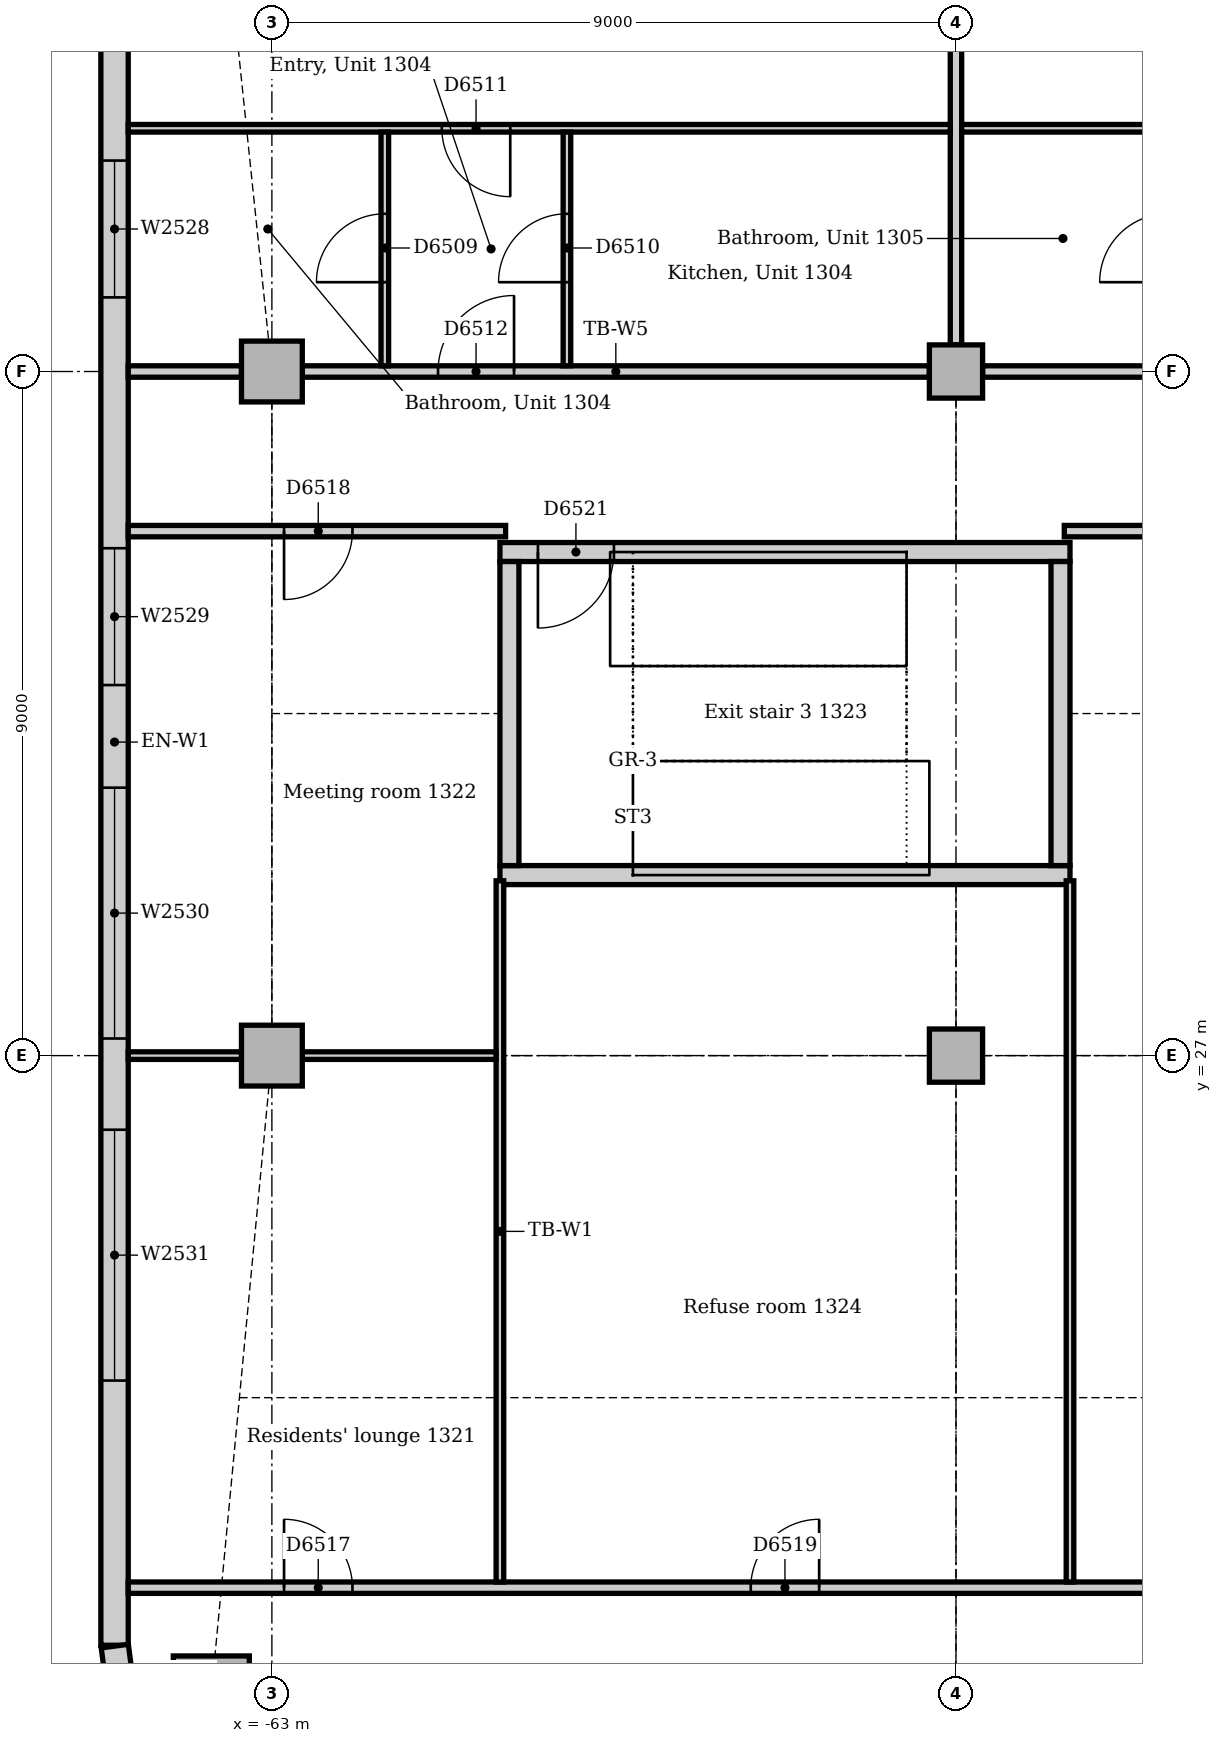
"""IFC4 building model, lengths in metres.
Left out: names, types, materials, properties, quantities, classifications, styles, units other than length and angle.
Written with IfcOpenShell. Run it as: python <this file> out.ifc"""

import sys

from ifc_helpers import new_model, si_unit, direction, frame, frame_2d, origin, origin_2d, place, context, subcontext, project, spatial, rectangle, extrude, element, fill, save


model = new_model("IFC4")
c1 = context("Model", 3, precision=1e-05, world=origin(), true_north=direction((0.0, 1.0)))
c2 = subcontext(c1, "Body", "Model", "MODEL_VIEW")
j1 = project(units=[si_unit("LENGTHUNIT", "METRE"), si_unit("PLANEANGLEUNIT", "RADIAN")], contexts=[c1])
p1 = place(None, origin())
s1 = spatial("IfcSite", under=j1, at=p1, CompositionType="ELEMENT")
p2 = place(p1, origin())
s2 = spatial("IfcBuilding", under=s1, at=p2, CompositionType="ELEMENT")
p3 = place(p2, frame((0.0, 0.0, 59.0)))
s3 = spatial("IfcBuildingStorey", under=s2, at=p3, CompositionType="ELEMENT", Elevation=59.0)
p4 = place(p3, frame((-60.0, 29.375, 0.0), z_axis=(0.0, 0.0, 1.0), x_axis=(1.0, 0.0, 0.0)))
e1 = element("IfcWall", 1, at=p4, inside=s3, PredefinedType="SOLIDWALL", context=c2, shape_type="SweptSolid", body=[
    extrude(rectangle(XDim=7.5, YDim=0.25, at=frame_2d((3.75, 0.0))), origin(), (0.0, 0.0, 1.0), 4.0),
])
p5 = place(p3, frame((-52.5, 33.625, 0.0), z_axis=(0.0, 0.0, 1.0), x_axis=(-1.0, 0.0, 0.0)))
e2 = element("IfcWall", 2, at=p5, inside=s3, PredefinedType="SOLIDWALL", context=c2, shape_type="SweptSolid", body=[
    extrude(rectangle(XDim=7.5, YDim=0.25, at=frame_2d((3.75, 0.0))), origin(), (0.0, 0.0, 1.0), 4.0),
])
p6 = place(p5, frame((6.0, 0.0, 0.0)))
e3 = element("IfcOpeningElement", 3, at=p6, cuts=e2, PredefinedType="OPENING", context=c2, shape_type="SweptSolid", body=[
    extrude(rectangle(XDim=1.0, YDim=2.1, at=frame_2d((0.5, 1.05))), frame((0.0, 0.135, 0.0), z_axis=(0.0, -1.0, 0.0), x_axis=(1.0, 0.0, 0.0)), (0.0, 0.0, 1.0), 0.27),
])
for number, where, z_axis, x_axis in (
    (4, (-52.625, 29.5, 0.0), (0.0, 0.0, 1.0), (0.0, 1.0, 0.0)),
    (5, (-59.875, 33.5, 0.0), (0.0, 0.0, 1.0), (0.0, -1.0, 0.0)),
):
    element("IfcWall", number, at=place(p3, frame(where, z_axis=z_axis, x_axis=x_axis)), inside=s3, PredefinedType="SOLIDWALL", context=c2, shape_type="SweptSolid", body=[
        extrude(rectangle(XDim=4.0, YDim=0.25, at=frame_2d((2.0, 0.0))), origin(), (0.0, 0.0, 1.0), 4.0),
    ])
p7 = place(p3, frame((-63.797, 18.602, 0.0), z_axis=(0.0, 0.0, 1.0), x_axis=(1.0, 0.0, 0.0)))
e6 = element("IfcColumn", 6, at=p7, inside=s3, PredefinedType="COLUMN", context=c2, shape_type="SweptSolid", body=[
    extrude(rectangle(XDim=1.0, YDim=1.0, at=origin_2d()), origin(), (0.0, 0.0, 1.0), 3.85),
])
for number, where, z_axis, x_axis in (
    (7, (-63.0, 27.0, 0.0), (0.0, 0.0, 1.0), (1.0, 0.0, 0.0)),
    (8, (-63.0, 36.0, 0.0), (0.0, 0.0, 1.0), (1.0, 0.0, 0.0)),
):
    element("IfcColumn", number, at=place(p3, frame(where, z_axis=z_axis, x_axis=x_axis)), inside=s3, PredefinedType="COLUMN", context=c2, shape_type="SweptSolid", body=[
        extrude(rectangle(XDim=0.8, YDim=0.8, at=origin_2d()), origin(), (0.0, 0.0, 1.0), 3.85),
    ])
for number, where, z_axis, x_axis in (
    (9, (-54.0, 27.0, 0.0), (0.0, 0.0, 1.0), (1.0, 0.0, 0.0)),
    (10, (-54.0, 36.0, 0.0), (0.0, 0.0, 1.0), (1.0, 0.0, 0.0)),
):
    element("IfcColumn", number, at=place(p3, frame(where, z_axis=z_axis, x_axis=x_axis)), inside=s3, PredefinedType="COLUMN", context=c2, shape_type="SweptSolid", body=[
        extrude(rectangle(XDim=0.7, YDim=0.7, at=origin_2d()), origin(), (0.0, 0.0, 1.0), 3.85),
    ])
p8 = place(p3, frame((-65.07, 43.007, 0.0), z_axis=(0.0, 0.0, 1.0), x_axis=(0.0, -1.0, 0.0)))
e11 = element("IfcWall", 11, at=p8, inside=s3, PredefinedType="STANDARD", context=c2, shape_type="SweptSolid", body=[
    extrude(rectangle(XDim=23.765, YDim=0.36, at=frame_2d((11.882, 0.0))), origin(), (0.0, 0.0, 1.0), 3.85),
])
p9 = place(p8, frame((4.232, 0.0, 0.9)))
e12 = element("IfcOpeningElement", 12, at=p9, cuts=e11, PredefinedType="OPENING", context=c2, shape_type="SweptSolid", body=[
    extrude(rectangle(XDim=1.8, YDim=1.6, at=frame_2d((0.9, 0.8))), frame((0.0, 0.19, 0.0), z_axis=(0.0, -1.0, 0.0), x_axis=(1.0, 0.0, 0.0)), (0.0, 0.0, 1.0), 0.38),
])
p10 = place(p8, frame((9.332, 0.0, 0.9)))
e13 = element("IfcOpeningElement", 13, at=p10, cuts=e11, PredefinedType="OPENING", context=c2, shape_type="SweptSolid", body=[
    extrude(rectangle(XDim=1.8, YDim=1.6, at=frame_2d((0.9, 0.8))), frame((0.0, 0.19, 0.0), z_axis=(0.0, -1.0, 0.0), x_axis=(1.0, 0.0, 0.0)), (0.0, 0.0, 1.0), 0.38),
])
p11 = place(p8, frame((12.482, 0.0, 0.9)))
e14 = element("IfcOpeningElement", 14, at=p11, cuts=e11, PredefinedType="OPENING", context=c2, shape_type="SweptSolid", body=[
    extrude(rectangle(XDim=3.3, YDim=1.6, at=frame_2d((1.65, 0.8))), frame((0.0, 0.19, 0.0), z_axis=(0.0, -1.0, 0.0), x_axis=(1.0, 0.0, 0.0)), (0.0, 0.0, 1.0), 0.38),
])
p12 = place(p8, frame((16.982, 0.0, 0.9)))
e15 = element("IfcOpeningElement", 15, at=p12, cuts=e11, PredefinedType="OPENING", context=c2, shape_type="SweptSolid", body=[
    extrude(rectangle(XDim=3.3, YDim=1.6, at=frame_2d((1.65, 0.8))), frame((0.0, 0.19, 0.0), z_axis=(0.0, -1.0, 0.0), x_axis=(1.0, 0.0, 0.0)), (0.0, 0.0, 1.0), 0.38),
])
p13 = place(p3, frame((-65.067, 19.231, 0.0), z_axis=(0.0, 0.0, 1.0), x_axis=(0.13055608231, -0.99144092581, 0.0)))
e16 = element("IfcWall", 16, at=p13, inside=s3, PredefinedType="STANDARD", context=c2, shape_type="SweptSolid", body=[
    extrude(rectangle(XDim=0.713, YDim=0.36, at=frame_2d((0.356, 0.0))), origin(), (0.0, 0.0, 1.0), 3.85),
])
p14 = place(p3, frame((-53.65, 36.0, 0.0), z_axis=(0.0, 0.0, 1.0), x_axis=(1.0, 0.0, 0.0)))
e17 = element("IfcWall", 17, at=p14, inside=s3, PredefinedType="PARTITIONING", context=c2, shape_type="SweptSolid", body=[
    extrude(rectangle(XDim=8.3, YDim=0.15, at=frame_2d((4.15, 0.0))), origin(), (0.0, 0.0, 1.0), 3.158),
])
p15 = place(p14, frame((2.94, 0.0, 0.0)))
e18 = element("IfcOpeningElement", 18, at=p15, cuts=e17, PredefinedType="OPENING", context=c2, shape_type="SweptSolid", body=[
    extrude(rectangle(XDim=1.0, YDim=2.1, at=frame_2d((0.5, 1.05))), frame((0.0, 0.085, 0.0), z_axis=(0.0, -1.0, 0.0), x_axis=(1.0, 0.0, 0.0)), (0.0, 0.0, 1.0), 0.17),
])
p16 = place(p3, frame((-62.6, 36.0, 0.0), z_axis=(0.0, 0.0, 1.0), x_axis=(1.0, 0.0, 0.0)))
e19 = element("IfcWall", 19, at=p16, inside=s3, PredefinedType="PARTITIONING", context=c2, shape_type="SweptSolid", body=[
    extrude(rectangle(XDim=8.25, YDim=0.15, at=frame_2d((4.125, 0.0))), origin(), (0.0, 0.0, 1.0), 3.158),
])
p17 = place(p16, frame((1.786, 0.0, 0.0)))
e20 = element("IfcOpeningElement", 20, at=p17, cuts=e19, PredefinedType="OPENING", context=c2, shape_type="SweptSolid", body=[
    extrude(rectangle(XDim=1.0, YDim=2.1, at=frame_2d((0.5, 1.05))), frame((0.0, 0.085, 0.0), z_axis=(0.0, -1.0, 0.0), x_axis=(1.0, 0.0, 0.0)), (0.0, 0.0, 1.0), 0.17),
])
p18 = place(p3, frame((-64.89, 36.0, 0.0), z_axis=(0.0, 0.0, 1.0), x_axis=(1.0, 0.0, 0.0)))
e21 = element("IfcWall", 21, at=p18, inside=s3, PredefinedType="PARTITIONING", context=c2, shape_type="SweptSolid", body=[
    extrude(rectangle(XDim=1.49, YDim=0.15, at=frame_2d((0.745, 0.0))), origin(), (0.0, 0.0, 1.0), 3.85),
])
p19 = place(p3, frame((-64.89, 20.0, 0.0), z_axis=(0.0, 0.0, 1.0), x_axis=(1.0, 0.0, 0.0)))
e22 = element("IfcWall", 22, at=p19, inside=s3, PredefinedType="PARTITIONING", context=c2, shape_type="SweptSolid", body=[
    extrude(rectangle(XDim=19.965, YDim=0.15, at=frame_2d((9.982, 0.0))), origin(), (0.0, 0.0, 1.0), 3.85),
])
p20 = place(p19, frame((2.05, 0.0, 0.0)))
e23 = element("IfcOpeningElement", 23, at=p20, cuts=e22, PredefinedType="OPENING", context=c2, shape_type="SweptSolid", body=[
    extrude(rectangle(XDim=0.9, YDim=2.1, at=frame_2d((0.45, 1.05))), frame((0.0, 0.085, 0.0), z_axis=(0.0, -1.0, 0.0), x_axis=(1.0, 0.0, 0.0)), (0.0, 0.0, 1.0), 0.17),
])
p21 = place(p19, frame((8.19, 0.0, 0.0)))
e24 = element("IfcOpeningElement", 24, at=p21, cuts=e22, PredefinedType="OPENING", context=c2, shape_type="SweptSolid", body=[
    extrude(rectangle(XDim=0.9, YDim=2.1, at=frame_2d((0.45, 1.05))), frame((0.0, 0.085, 0.0), z_axis=(0.0, -1.0, 0.0), x_axis=(1.0, 0.0, 0.0)), (0.0, 0.0, 1.0), 0.17),
])
p22 = place(p3, frame((-52.575, 33.9, 0.0), z_axis=(0.0, 0.0, 1.0), x_axis=(1.0, 0.0, 0.0)))
e25 = element("IfcWall", 25, at=p22, inside=s3, PredefinedType="PARTITIONING", context=c2, shape_type="SweptSolid", body=[
    extrude(rectangle(XDim=7.5, YDim=0.15, at=frame_2d((3.75, 0.0))), origin(), (0.0, 0.0, 1.0), 3.85),
])
p23 = place(p3, frame((-64.89, 33.9, 0.0), z_axis=(0.0, 0.0, 1.0), x_axis=(1.0, 0.0, 0.0)))
e26 = element("IfcWall", 26, at=p23, inside=s3, PredefinedType="PARTITIONING", context=c2, shape_type="SweptSolid", body=[
    extrude(rectangle(XDim=4.965, YDim=0.15, at=frame_2d((2.482, 0.0))), origin(), (0.0, 0.0, 1.0), 3.85),
])
p24 = place(p23, frame((2.05, 0.0, 0.0)))
e27 = element("IfcOpeningElement", 27, at=p24, cuts=e26, PredefinedType="OPENING", context=c2, shape_type="SweptSolid", body=[
    extrude(rectangle(XDim=0.9, YDim=2.1, at=frame_2d((0.45, 1.05))), frame((0.0, 0.085, 0.0), z_axis=(0.0, -1.0, 0.0), x_axis=(1.0, 0.0, 0.0)), (0.0, 0.0, 1.0), 0.17),
])
p25 = place(p3, frame((-54.0, 36.35, 0.0), z_axis=(0.0, 0.0, 1.0), x_axis=(0.0, 1.0, 0.0)))
e28 = element("IfcWall", 28, at=p25, inside=s3, PredefinedType="PARTITIONING", context=c2, shape_type="SweptSolid", body=[
    extrude(rectangle(XDim=9.6, YDim=0.15, at=frame_2d((4.8, 0.0))), origin(), (0.0, 0.0, 1.0), 3.256),
])
p26 = place(p3, frame((-53.925, 39.2, 0.0), z_axis=(0.0, 0.0, 1.0), x_axis=(1.0, 0.0, 0.0)))
e29 = element("IfcWall", 29, at=p26, inside=s3, PredefinedType="PARTITIONING", context=c2, shape_type="SweptSolid", body=[
    extrude(rectangle(XDim=8.975, YDim=0.1, at=frame_2d((4.487, 0.0))), origin(), (0.0, 0.0, 1.0), 3.85),
])
p27 = place(p26, frame((3.265, 0.0, 0.0)))
e30 = element("IfcOpeningElement", 30, at=p27, cuts=e29, PredefinedType="OPENING", context=c2, shape_type="SweptSolid", body=[
    extrude(rectangle(XDim=0.9, YDim=2.1, at=frame_2d((0.45, 1.05))), frame((0.0, 0.06, 0.0), z_axis=(0.0, -1.0, 0.0), x_axis=(1.0, 0.0, 0.0)), (0.0, 0.0, 1.0), 0.12),
])
p28 = place(p3, frame((-64.89, 39.2, 0.0), z_axis=(0.0, 0.0, 1.0), x_axis=(1.0, 0.0, 0.0)))
e31 = element("IfcWall", 31, at=p28, inside=s3, PredefinedType="PARTITIONING", context=c2, shape_type="SweptSolid", body=[
    extrude(rectangle(XDim=10.815, YDim=0.1, at=frame_2d((5.407, 0.0))), origin(), (0.0, 0.0, 1.0), 3.85),
])
p29 = place(p28, frame((4.126, 0.0, 0.0)))
e32 = element("IfcOpeningElement", 32, at=p29, cuts=e31, PredefinedType="OPENING", context=c2, shape_type="SweptSolid", body=[
    extrude(rectangle(XDim=0.9, YDim=2.1, at=frame_2d((0.45, 1.05))), frame((0.0, 0.06, 0.0), z_axis=(0.0, -1.0, 0.0), x_axis=(1.0, 0.0, 0.0)), (0.0, 0.0, 1.0), 0.12),
])
for number, where, z_axis, x_axis in (
    (33, (-60.0, 20.075, 0.0), (0.0, 0.0, 1.0), (0.0, 1.0, 0.0)),
    (34, (-52.5, 20.075, 0.0), (0.0, 0.0, 1.0), (0.0, 1.0, 0.0)),
):
    element("IfcWall", number, at=place(p3, frame(where, z_axis=z_axis, x_axis=x_axis)), inside=s3, PredefinedType="PARTITIONING", context=c2, shape_type="SweptSolid", body=[
        extrude(rectangle(XDim=9.225, YDim=0.1, at=frame_2d((4.612, 0.0))), origin(), (0.0, 0.0, 1.0), 3.85),
    ])
p30 = place(p3, frame((-62.6, 27.0, 0.0), z_axis=(0.0, 0.0, 1.0), x_axis=(1.0, 0.0, 0.0)))
e35 = element("IfcWall", 35, at=p30, inside=s3, PredefinedType="PARTITIONING", context=c2, shape_type="SweptSolid", body=[
    extrude(rectangle(XDim=2.55, YDim=0.1, at=frame_2d((1.275, 0.0))), origin(), (0.0, 0.0, 1.0), 3.158),
])
p31 = place(p3, frame((-64.89, 27.0, 0.0), z_axis=(0.0, 0.0, 1.0), x_axis=(1.0, 0.0, 0.0)))
e36 = element("IfcWall", 36, at=p31, inside=s3, PredefinedType="PARTITIONING", context=c2, shape_type="SweptSolid", body=[
    extrude(rectangle(XDim=1.49, YDim=0.1, at=frame_2d((0.745, 0.0))), origin(), (0.0, 0.0, 1.0), 3.85),
])
p32 = place(p3, frame((-61.514, 36.075, 0.0), z_axis=(0.0, 0.0, 1.0), x_axis=(0.0, 1.0, 0.0)))
e37 = element("IfcWall", 37, at=p32, inside=s3, PredefinedType="PARTITIONING", context=c2, shape_type="SweptSolid", body=[
    extrude(rectangle(XDim=3.075, YDim=0.1, at=frame_2d((1.538, 0.0))), origin(), (0.0, 0.0, 1.0), 3.85),
])
p33 = place(p32, frame((1.1, 0.0, 0.0)))
e38 = element("IfcOpeningElement", 38, at=p33, cuts=e37, PredefinedType="OPENING", context=c2, shape_type="SweptSolid", body=[
    extrude(rectangle(XDim=0.9, YDim=2.1, at=frame_2d((0.45, 1.05))), frame((0.0, 0.06, 0.0), z_axis=(0.0, -1.0, 0.0), x_axis=(1.0, 0.0, 0.0)), (0.0, 0.0, 1.0), 0.12),
])
p34 = place(p3, frame((-59.118, 36.075, 0.0), z_axis=(0.0, 0.0, 1.0), x_axis=(0.0, 1.0, 0.0)))
e39 = element("IfcWall", 39, at=p34, inside=s3, PredefinedType="PARTITIONING", context=c2, shape_type="SweptSolid", body=[
    extrude(rectangle(XDim=3.075, YDim=0.1, at=frame_2d((1.538, 0.0))), origin(), (0.0, 0.0, 1.0), 3.85),
])
p35 = place(p34, frame((1.1, 0.0, 0.0)))
e40 = element("IfcOpeningElement", 40, at=p35, cuts=e39, PredefinedType="OPENING", context=c2, shape_type="SweptSolid", body=[
    extrude(rectangle(XDim=0.9, YDim=2.1, at=frame_2d((0.45, 1.05))), frame((0.0, 0.06, 0.0), z_axis=(0.0, -1.0, 0.0), x_axis=(1.0, 0.0, 0.0)), (0.0, 0.0, 1.0), 0.12),
])
p36 = place(p9, origin())
e41 = element("IfcWindow", 41, at=p36, inside=s3, PartitioningType="SINGLE_PANEL", PredefinedType="WINDOW", context=c2, shape_type="SweptSolid", body=[
    extrude(rectangle(XDim=1.8, YDim=1.6, at=frame_2d((0.9, 0.8))), frame((0.0, 0.13, 0.0), z_axis=(0.0, -1.0, 0.0), x_axis=(1.0, 0.0, 0.0)), (0.0, 0.0, 1.0), 0.06),
])
fill(e12, e41)
p37 = place(p10, origin())
e42 = element("IfcWindow", 42, at=p37, inside=s3, PartitioningType="SINGLE_PANEL", PredefinedType="WINDOW", context=c2, shape_type="SweptSolid", body=[
    extrude(rectangle(XDim=1.8, YDim=1.6, at=frame_2d((0.9, 0.8))), frame((0.0, 0.13, 0.0), z_axis=(0.0, -1.0, 0.0), x_axis=(1.0, 0.0, 0.0)), (0.0, 0.0, 1.0), 0.06),
])
fill(e13, e42)
p38 = place(p11, origin())
e43 = element("IfcWindow", 43, at=p38, inside=s3, PartitioningType="SINGLE_PANEL", PredefinedType="WINDOW", context=c2, shape_type="SweptSolid", body=[
    extrude(rectangle(XDim=3.3, YDim=1.6, at=frame_2d((1.65, 0.8))), frame((0.0, 0.13, 0.0), z_axis=(0.0, -1.0, 0.0), x_axis=(1.0, 0.0, 0.0)), (0.0, 0.0, 1.0), 0.06),
])
fill(e14, e43)
p39 = place(p12, origin())
e44 = element("IfcWindow", 44, at=p39, inside=s3, PartitioningType="SINGLE_PANEL", PredefinedType="WINDOW", context=c2, shape_type="SweptSolid", body=[
    extrude(rectangle(XDim=3.3, YDim=1.6, at=frame_2d((1.65, 0.8))), frame((0.0, 0.13, 0.0), z_axis=(0.0, -1.0, 0.0), x_axis=(1.0, 0.0, 0.0)), (0.0, 0.0, 1.0), 0.06),
])
fill(e15, e44)
p40 = place(p33, origin())
e45 = element("IfcDoor", 45, at=p40, inside=s3, OperationType="SINGLE_SWING_LEFT", PredefinedType="DOOR", context=c2, shape_type="SweptSolid", body=[
    extrude(rectangle(XDim=0.9, YDim=2.1, at=frame_2d((0.45, 1.05))), frame((0.0, 0.025, 0.0), z_axis=(0.0, -1.0, 0.0), x_axis=(1.0, 0.0, 0.0)), (0.0, 0.0, 1.0), 0.05),
])
fill(e38, e45)
p41 = place(p35, origin())
e46 = element("IfcDoor", 46, at=p41, inside=s3, OperationType="SINGLE_SWING_LEFT", PredefinedType="DOOR", context=c2, shape_type="SweptSolid", body=[
    extrude(rectangle(XDim=0.9, YDim=2.1, at=frame_2d((0.45, 1.05))), frame((0.0, 0.025, 0.0), z_axis=(0.0, -1.0, 0.0), x_axis=(1.0, 0.0, 0.0)), (0.0, 0.0, 1.0), 0.05),
])
fill(e40, e46)
p42 = place(p29, frame((0.9, 0.0, 0.0), z_axis=(0.0, 0.0, 1.0), x_axis=(-1.0, 0.0, 0.0)))
e47 = element("IfcDoor", 47, at=p42, inside=s3, OperationType="SINGLE_SWING_LEFT", PredefinedType="DOOR", context=c2, shape_type="SweptSolid", body=[
    extrude(rectangle(XDim=0.9, YDim=2.1, at=frame_2d((0.45, 1.05))), frame((0.0, 0.025, 0.0), z_axis=(0.0, -1.0, 0.0), x_axis=(1.0, 0.0, 0.0)), (0.0, 0.0, 1.0), 0.05),
])
fill(e32, e47)
p43 = place(p17, origin())
e48 = element("IfcDoor", 48, at=p43, inside=s3, OperationType="SINGLE_SWING_RIGHT", PredefinedType="DOOR", context=c2, shape_type="SweptSolid", body=[
    extrude(rectangle(XDim=1.0, YDim=2.1, at=frame_2d((0.5, 1.05))), frame((0.0, 0.025, 0.0), z_axis=(0.0, -1.0, 0.0), x_axis=(1.0, 0.0, 0.0)), (0.0, 0.0, 1.0), 0.05),
])
fill(e20, e48)
p44 = place(p20, origin())
e49 = element("IfcDoor", 49, at=p44, inside=s3, OperationType="SINGLE_SWING_LEFT", PredefinedType="DOOR", context=c2, shape_type="SweptSolid", body=[
    extrude(rectangle(XDim=0.9, YDim=2.1, at=frame_2d((0.45, 1.05))), frame((0.0, 0.025, 0.0), z_axis=(0.0, -1.0, 0.0), x_axis=(1.0, 0.0, 0.0)), (0.0, 0.0, 1.0), 0.05),
])
fill(e23, e49)
p45 = place(p24, frame((0.9, 0.0, 0.0), z_axis=(0.0, 0.0, 1.0), x_axis=(-1.0, 0.0, 0.0)))
e50 = element("IfcDoor", 50, at=p45, inside=s3, OperationType="SINGLE_SWING_RIGHT", PredefinedType="DOOR", context=c2, shape_type="SweptSolid", body=[
    extrude(rectangle(XDim=0.9, YDim=2.1, at=frame_2d((0.45, 1.05))), frame((0.0, 0.025, 0.0), z_axis=(0.0, -1.0, 0.0), x_axis=(1.0, 0.0, 0.0)), (0.0, 0.0, 1.0), 0.05),
])
fill(e27, e50)
p46 = place(p21, origin())
e51 = element("IfcDoor", 51, at=p46, inside=s3, OperationType="SINGLE_SWING_RIGHT", PredefinedType="DOOR", context=c2, shape_type="SweptSolid", body=[
    extrude(rectangle(XDim=0.9, YDim=2.1, at=frame_2d((0.45, 1.05))), frame((0.0, 0.025, 0.0), z_axis=(0.0, -1.0, 0.0), x_axis=(1.0, 0.0, 0.0)), (0.0, 0.0, 1.0), 0.05),
])
fill(e24, e51)
p47 = place(p6, origin())
e52 = element("IfcDoor", 52, at=p47, inside=s3, OperationType="SINGLE_SWING_RIGHT", PredefinedType="DOOR", context=c2, shape_type="SweptSolid", body=[
    extrude(rectangle(XDim=1.0, YDim=2.1, at=frame_2d((0.5, 1.05))), frame((0.0, 0.025, 0.0), z_axis=(0.0, -1.0, 0.0), x_axis=(1.0, 0.0, 0.0)), (0.0, 0.0, 1.0), 0.05),
])
fill(e3, e52)
save(model, sys.argv[1])
